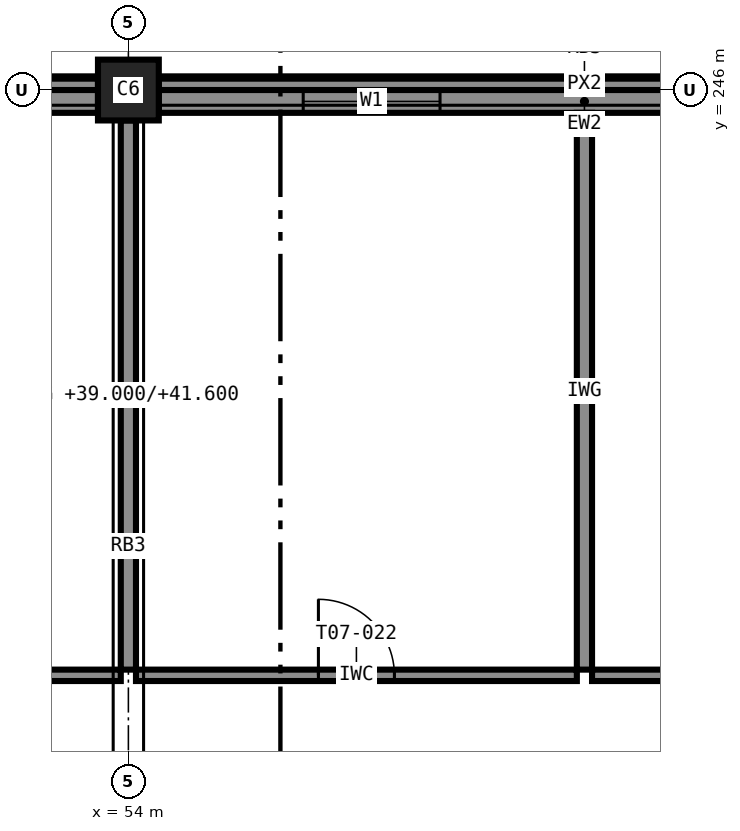
"""IFC4 building model, lengths in metres.
Left out: names, types, materials, properties, quantities, classifications, styles, units other than length and angle.
Written with IfcOpenShell. Run it as: python <this file> out.ifc"""

import sys

from ifc_helpers import new_model, si_unit, direction, frame, frame_2d, origin, origin_2d, place, context, subcontext, project, spatial, rectangle, extrude, element, fill, save


model = new_model("IFC4")
c1 = context("Model", 3, precision=1e-05, world=origin(), true_north=direction((0.0, 1.0)))
c2 = subcontext(c1, "Body", "Model", "MODEL_VIEW")
j1 = project(units=[si_unit("LENGTHUNIT", "METRE"), si_unit("PLANEANGLEUNIT", "RADIAN")], contexts=[c1])
p1 = place(None, origin())
s1 = spatial("IfcSite", under=j1, at=p1, CompositionType="ELEMENT")
p2 = place(p1, origin())
s2 = spatial("IfcBuilding", under=s1, at=p2, CompositionType="ELEMENT")
p3 = place(p2, frame((0.0, 0.0, 39.0)))
s3 = spatial("IfcBuildingStorey", under=s2, at=p3, CompositionType="ELEMENT", Elevation=39.0)
p4 = place(p3, frame((54.0, 246.0, 0.0), z_axis=(0.0, 0.0, 1.0), x_axis=(1.0, 0.0, 0.0)))
e1 = element("IfcColumn", 1, at=p4, inside=s3, PredefinedType="COLUMN", context=c2, shape_type="SweptSolid", body=[
    extrude(rectangle(XDim=0.8, YDim=0.8, at=origin_2d()), origin(), (0.0, 0.0, 1.0), 3.6),
])
p5 = place(p3, frame((65.6, 245.85, 0.0), z_axis=(0.0, 0.0, 1.0), x_axis=(-1.0, 0.0, 0.0)))
e2 = element("IfcWall", 2, at=p5, inside=s3, PredefinedType="STANDARD", context=c2, shape_type="SweptSolid", body=[
    extrude(rectangle(XDim=11.2, YDim=0.3, at=frame_2d((5.6, 0.0))), origin(), (0.0, 0.0, 1.0), 2.6),
])
p6 = place(p5, frame((7.5, 0.0, 0.85)))
e3 = element("IfcOpeningElement", 3, at=p6, cuts=e2, PredefinedType="OPENING", context=c2, shape_type="SweptSolid", body=[
    extrude(rectangle(XDim=1.8, YDim=1.75, at=frame_2d((0.9, 0.875))), frame((0.0, 0.16, 0.0), z_axis=(0.0, -1.0, 0.0), x_axis=(1.0, 0.0, 0.0)), (0.0, 0.0, 1.0), 0.32),
])
p7 = place(p5, frame((1.9, 0.0, 0.85)))
e4 = element("IfcOpeningElement", 4, at=p7, cuts=e2, PredefinedType="OPENING", context=c2, shape_type="SweptSolid", body=[
    extrude(rectangle(XDim=1.8, YDim=1.75, at=frame_2d((0.9, 0.875))), frame((0.0, 0.16, 0.0), z_axis=(0.0, -1.0, 0.0), x_axis=(1.0, 0.0, 0.0)), (0.0, 0.0, 1.0), 0.32),
])
p8 = place(p3, frame((53.6, 245.85, 0.0), z_axis=(0.0, 0.0, 1.0), x_axis=(-1.0, 0.0, 0.0)))
e5 = element("IfcWall", 5, at=p8, inside=s3, PredefinedType="STANDARD", context=c2, shape_type="SweptSolid", body=[
    extrude(rectangle(XDim=11.2, YDim=0.3, at=frame_2d((5.6, 0.0))), origin(), (0.0, 0.0, 1.0), 2.6),
])
p9 = place(p8, frame((1.0, 0.0, 0.85)))
e6 = element("IfcOpeningElement", 6, at=p9, cuts=e5, PredefinedType="OPENING", context=c2, shape_type="SweptSolid", body=[
    extrude(rectangle(XDim=1.8, YDim=1.75, at=frame_2d((0.9, 0.875))), frame((0.0, 0.16, 0.0), z_axis=(0.0, -1.0, 0.0), x_axis=(1.0, 0.0, 0.0)), (0.0, 0.0, 1.0), 0.32),
])
p10 = place(p8, frame((4.8, 0.0, 0.85)))
e7 = element("IfcOpeningElement", 7, at=p10, cuts=e5, PredefinedType="OPENING", context=c2, shape_type="SweptSolid", body=[
    extrude(rectangle(XDim=1.8, YDim=1.75, at=frame_2d((0.9, 0.875))), frame((0.0, 0.16, 0.0), z_axis=(0.0, -1.0, 0.0), x_axis=(1.0, 0.0, 0.0)), (0.0, 0.0, 1.0), 0.32),
])
for number, where, z_axis, x_axis in (
    (8, (65.6, 246.075, 3.4), (0.0, 0.0, 1.0), (-1.0, 0.0, 0.0)),
    (9, (53.6, 246.075, 3.4), (0.0, 0.0, 1.0), (-1.0, 0.0, 0.0)),
):
    element("IfcWall", number, at=place(p3, frame(where, z_axis=z_axis, x_axis=x_axis)), inside=s3, PredefinedType="STANDARD", context=c2, shape_type="SweptSolid", body=[
        extrude(rectangle(XDim=11.2, YDim=0.15, at=frame_2d((5.6, 0.0))), origin(), (0.0, 0.0, 1.0), 0.2),
    ])
p11 = place(p3, frame((46.0, 238.3, 0.0), z_axis=(0.0, 0.0, 1.0), x_axis=(1.0, 0.0, 0.0)))
e10 = element("IfcWall", 10, at=p11, inside=s3, PredefinedType="PARTITIONING", context=c2, shape_type="SweptSolid", body=[
    extrude(rectangle(XDim=7.9, YDim=0.15, at=frame_2d((3.95, 0.0))), origin(), (0.0, 0.0, 1.0), 3.4),
])
p12 = place(p11, frame((3.5, 0.0, 0.0)))
e11 = element("IfcOpeningElement", 11, at=p12, cuts=e10, PredefinedType="OPENING", context=c2, shape_type="SweptSolid", body=[
    extrude(rectangle(XDim=1.0, YDim=2.1, at=frame_2d((0.5, 1.05))), frame((0.0, 0.085, 0.0), z_axis=(0.0, -1.0, 0.0), x_axis=(1.0, 0.0, 0.0)), (0.0, 0.0, 1.0), 0.17),
])
p13 = place(p3, frame((54.1, 238.3, 0.0), z_axis=(0.0, 0.0, 1.0), x_axis=(1.0, 0.0, 0.0)))
e12 = element("IfcWall", 12, at=p13, inside=s3, PredefinedType="PARTITIONING", context=c2, shape_type="SweptSolid", body=[
    extrude(rectangle(XDim=5.8, YDim=0.15, at=frame_2d((2.9, 0.0))), origin(), (0.0, 0.0, 1.0), 3.4),
])
p14 = place(p13, frame((2.4, 0.0, 0.0)))
e13 = element("IfcOpeningElement", 13, at=p14, cuts=e12, PredefinedType="OPENING", context=c2, shape_type="SweptSolid", body=[
    extrude(rectangle(XDim=1.0, YDim=2.1, at=frame_2d((0.5, 1.05))), frame((0.0, 0.085, 0.0), z_axis=(0.0, -1.0, 0.0), x_axis=(1.0, 0.0, 0.0)), (0.0, 0.0, 1.0), 0.17),
])
p15 = place(p3, frame((60.1, 238.3, 0.0), z_axis=(0.0, 0.0, 1.0), x_axis=(1.0, 0.0, 0.0)))
e14 = element("IfcWall", 14, at=p15, inside=s3, PredefinedType="PARTITIONING", context=c2, shape_type="SweptSolid", body=[
    extrude(rectangle(XDim=5.8, YDim=0.15, at=frame_2d((2.9, 0.0))), origin(), (0.0, 0.0, 1.0), 3.4),
])
p16 = place(p15, frame((2.4, 0.0, 0.0)))
e15 = element("IfcOpeningElement", 15, at=p16, cuts=e14, PredefinedType="OPENING", context=c2, shape_type="SweptSolid", body=[
    extrude(rectangle(XDim=1.0, YDim=2.1, at=frame_2d((0.5, 1.05))), frame((0.0, 0.085, 0.0), z_axis=(0.0, -1.0, 0.0), x_axis=(1.0, 0.0, 0.0)), (0.0, 0.0, 1.0), 0.17),
])
p17 = place(p3, frame((54.0, 245.6, 0.0), z_axis=(0.0, 0.0, 1.0), x_axis=(0.0, -1.0, 0.0)))
e16 = element("IfcWall", 16, at=p17, inside=s3, PredefinedType="PARTITIONING", context=c2, shape_type="SweptSolid", body=[
    extrude(rectangle(XDim=7.225, YDim=0.2, at=frame_2d((3.613, 0.0))), origin(), (0.0, 0.0, 1.0), 2.6),
])
p18 = place(p3, frame((60.0, 245.7, 0.0), z_axis=(0.0, 0.0, 1.0), x_axis=(0.0, -1.0, 0.0)))
e17 = element("IfcWall", 17, at=p18, inside=s3, PredefinedType="PARTITIONING", context=c2, shape_type="SweptSolid", body=[
    extrude(rectangle(XDim=7.325, YDim=0.2, at=frame_2d((3.663, 0.0))), origin(), (0.0, 0.0, 1.0), 3.4),
])
p19 = place(p6, origin())
e18 = element("IfcWindow", 18, at=p19, inside=s3, PartitioningType="SINGLE_PANEL", PredefinedType="WINDOW", context=c2, shape_type="SweptSolid", body=[
    extrude(rectangle(XDim=1.8, YDim=1.75, at=frame_2d((0.9, 0.875))), frame((0.0, 0.03, 0.0), z_axis=(0.0, -1.0, 0.0), x_axis=(1.0, 0.0, 0.0)), (0.0, 0.0, 1.0), 0.06),
])
fill(e3, e18)
p20 = place(p14, origin())
e19 = element("IfcDoor", 19, at=p20, inside=s3, OperationType="SINGLE_SWING_LEFT", PredefinedType="DOOR", context=c2, shape_type="SweptSolid", body=[
    extrude(rectangle(XDim=1.0, YDim=2.1, at=frame_2d((0.5, 1.05))), frame((0.0, 0.025, 0.0), z_axis=(0.0, -1.0, 0.0), x_axis=(1.0, 0.0, 0.0)), (0.0, 0.0, 1.0), 0.05),
])
fill(e13, e19)
save(model, sys.argv[1])
